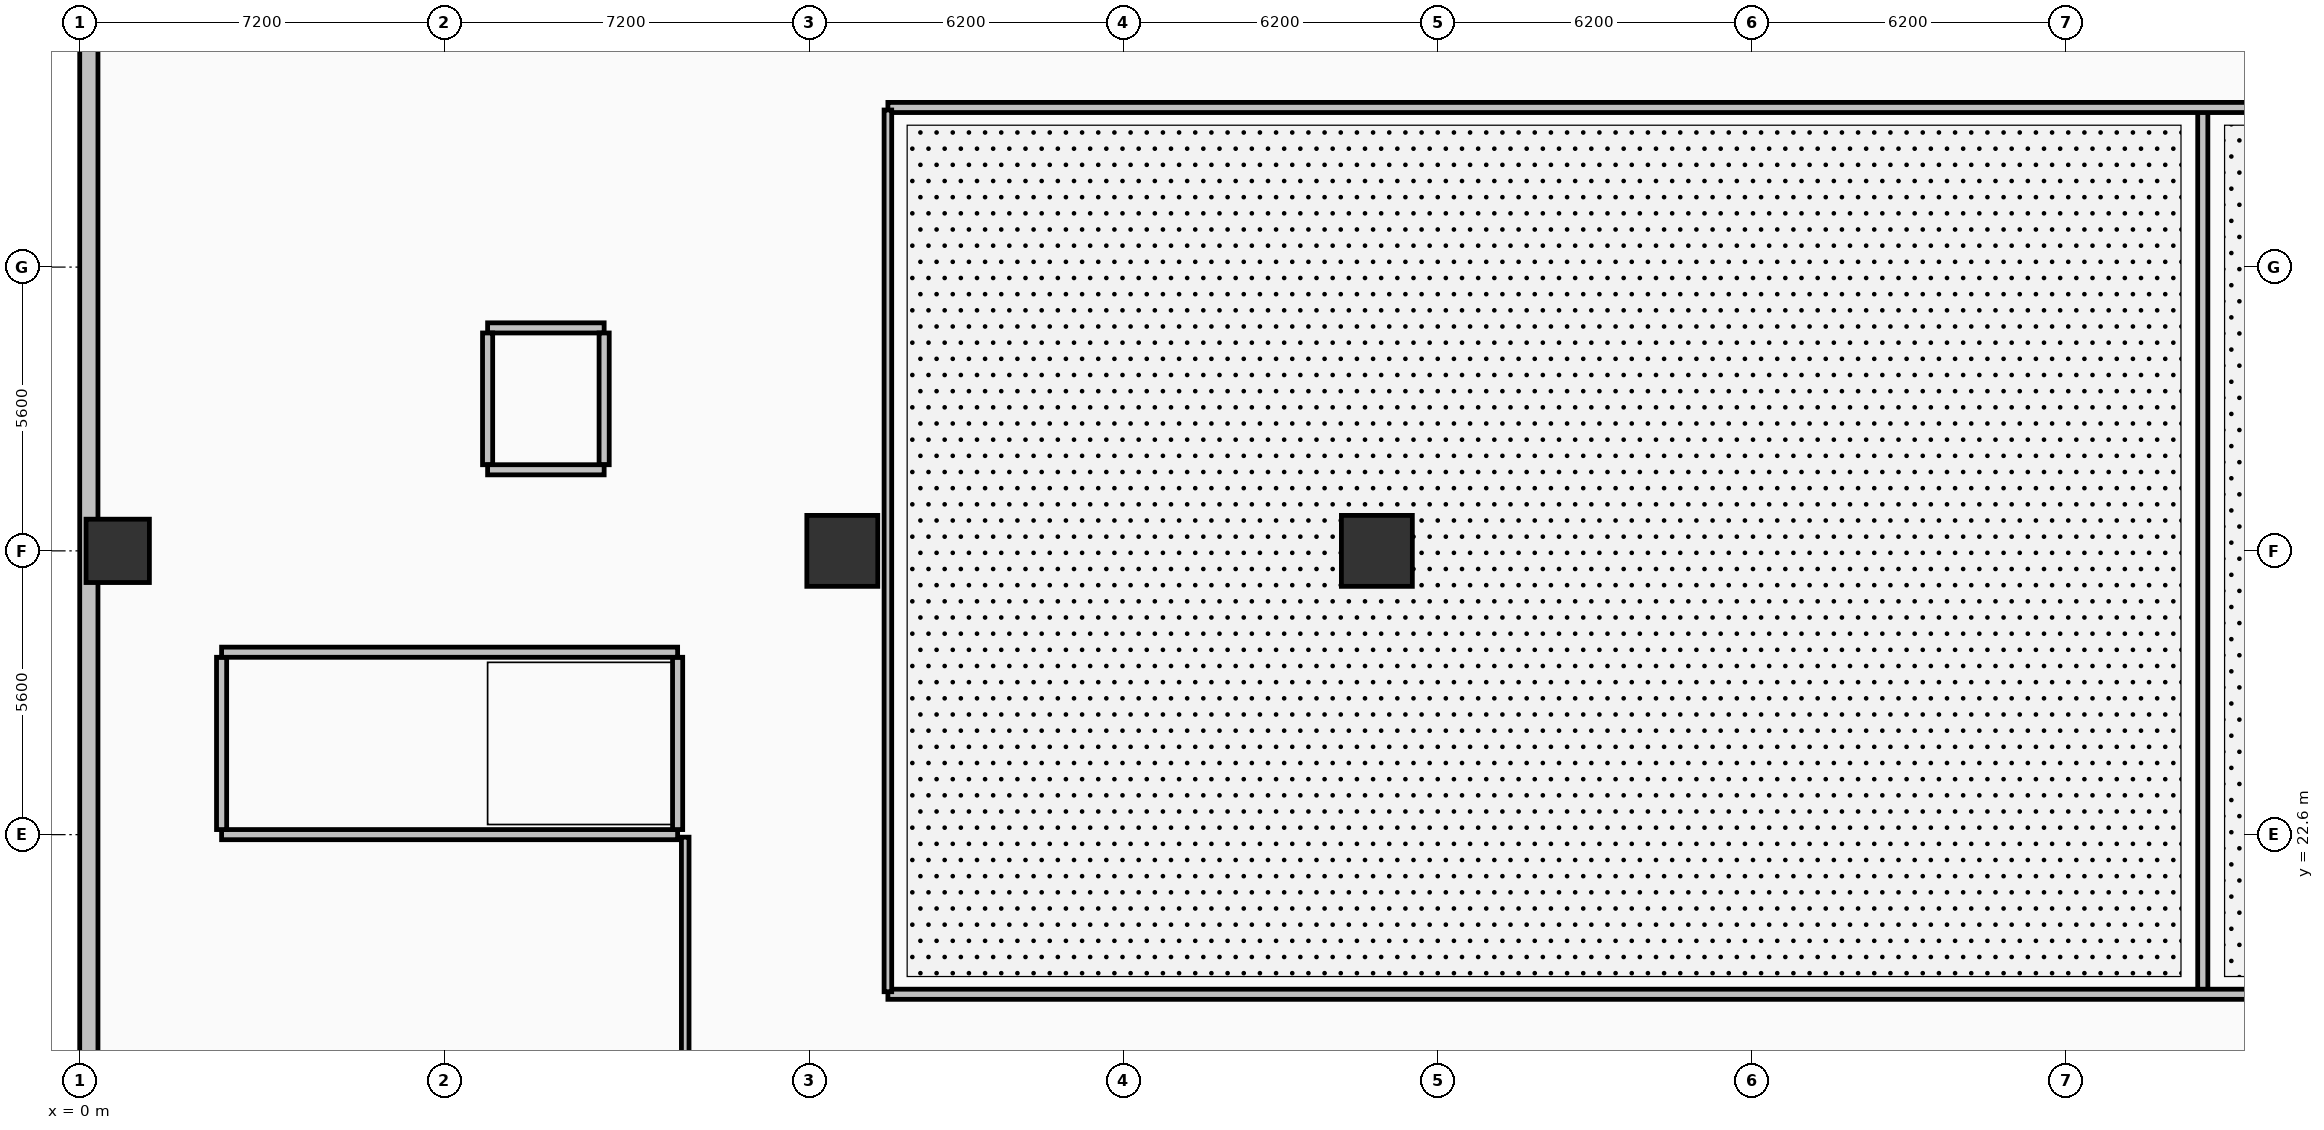
"""IFC4 building model, lengths in metres.
Left out: names, types, materials, properties, quantities, classifications, styles, units other than length and angle.
Written with IfcOpenShell. Run it as: python <this file> out.ifc"""

import sys

from ifc_helpers import new_model, si_unit, direction, frame, frame_2d, origin, origin_2d, place, context, subcontext, project, spatial, rectangle, extrude, element, fill, save


model = new_model("IFC4")
c1 = context("Model", 3, precision=1e-05, world=origin(), true_north=direction((0.0, 1.0)))
c2 = subcontext(c1, "Body", "Model", "MODEL_VIEW")
j1 = project(units=[si_unit("LENGTHUNIT", "METRE"), si_unit("PLANEANGLEUNIT", "RADIAN")], contexts=[c1])
p1 = place(None, origin())
s1 = spatial("IfcSite", under=j1, at=p1, CompositionType="ELEMENT")
p2 = place(p1, origin())
s2 = spatial("IfcBuilding", under=s1, at=p2, CompositionType="ELEMENT")
p3 = place(p2, frame((0.0, 0.0, 11.1)))
s3 = spatial("IfcBuildingStorey", under=s2, at=p3, CompositionType="ELEMENT", Elevation=11.1)
p4 = place(p3, frame((25.6, 28.2, 0.0), z_axis=(0.0, 0.0, 1.0), x_axis=(1.0, 0.0, 0.0)))
e1 = element("IfcColumn", 1, at=p4, inside=s3, PredefinedType="COLUMN", context=c2, shape_type="SweptSolid", body=[
    extrude(rectangle(XDim=1.4, YDim=1.4, at=origin_2d()), origin(), (0.0, 0.0, 1.0), 4.5),
])
p5 = place(p3, frame((0.75, 28.2, 0.0), z_axis=(0.0, 0.0, 1.0), x_axis=(1.0, 0.0, 0.0)))
e2 = element("IfcColumn", 2, at=p5, inside=s3, PredefinedType="COLUMN", context=c2, shape_type="SweptSolid", body=[
    extrude(rectangle(XDim=1.25, YDim=1.25, at=origin_2d()), origin(), (0.0, 0.0, 1.0), 4.5),
])
p6 = place(p3, frame((15.05, 28.2, 0.0), z_axis=(0.0, 0.0, 1.0), x_axis=(1.0, 0.0, 0.0)))
e3 = element("IfcColumn", 3, at=p6, inside=s3, PredefinedType="COLUMN", context=c2, shape_type="SweptSolid", body=[
    extrude(rectangle(XDim=1.4, YDim=1.4, at=origin_2d()), origin(), (0.0, 0.0, 1.0), 4.5),
])
p7 = place(p3, frame((0.18, 55.42, 0.0), z_axis=(0.0, 0.0, 1.0), x_axis=(0.0, -1.0, 0.0)))
e4 = element("IfcWall", 4, at=p7, inside=s3, PredefinedType="SOLIDWALL", context=c2, shape_type="SweptSolid", body=[
    extrude(rectangle(XDim=54.44, YDim=0.36, at=frame_2d((27.22, 0.0))), origin(), (0.0, 0.0, 1.0), 3.48),
])
p8 = place(p7, frame((1.411, 0.0, 0.9)))
e5 = element("IfcOpeningElement", 5, at=p8, cuts=e4, PredefinedType="OPENING", context=c2, shape_type="SweptSolid", body=[
    extrude(rectangle(XDim=1.8, YDim=2.1, at=frame_2d((0.9, 1.05))), frame((0.0, 0.19, 0.0), z_axis=(0.0, -1.0, 0.0), x_axis=(1.0, 0.0, 0.0)), (0.0, 0.0, 1.0), 0.38),
])
p9 = place(p7, frame((4.732, 0.0, 0.9)))
e6 = element("IfcOpeningElement", 6, at=p9, cuts=e4, PredefinedType="OPENING", context=c2, shape_type="SweptSolid", body=[
    extrude(rectangle(XDim=1.8, YDim=2.1, at=frame_2d((0.9, 1.05))), frame((0.0, 0.19, 0.0), z_axis=(0.0, -1.0, 0.0), x_axis=(1.0, 0.0, 0.0)), (0.0, 0.0, 1.0), 0.38),
])
p10 = place(p7, frame((11.375, 0.0, 0.9)))
e7 = element("IfcOpeningElement", 7, at=p10, cuts=e4, PredefinedType="OPENING", context=c2, shape_type="SweptSolid", body=[
    extrude(rectangle(XDim=1.8, YDim=2.1, at=frame_2d((0.9, 1.05))), frame((0.0, 0.19, 0.0), z_axis=(0.0, -1.0, 0.0), x_axis=(1.0, 0.0, 0.0)), (0.0, 0.0, 1.0), 0.38),
])
p11 = place(p7, frame((18.017, 0.0, 0.9)))
e8 = element("IfcOpeningElement", 8, at=p11, cuts=e4, PredefinedType="OPENING", context=c2, shape_type="SweptSolid", body=[
    extrude(rectangle(XDim=1.8, YDim=2.1, at=frame_2d((0.9, 1.05))), frame((0.0, 0.19, 0.0), z_axis=(0.0, -1.0, 0.0), x_axis=(1.0, 0.0, 0.0)), (0.0, 0.0, 1.0), 0.38),
])
p12 = place(p7, frame((21.338, 0.0, 0.9)))
e9 = element("IfcOpeningElement", 9, at=p12, cuts=e4, PredefinedType="OPENING", context=c2, shape_type="SweptSolid", body=[
    extrude(rectangle(XDim=1.8, YDim=2.1, at=frame_2d((0.9, 1.05))), frame((0.0, 0.19, 0.0), z_axis=(0.0, -1.0, 0.0), x_axis=(1.0, 0.0, 0.0)), (0.0, 0.0, 1.0), 0.38),
])
p13 = place(p7, frame((23.959, 0.0, 0.9)))
e10 = element("IfcOpeningElement", 10, at=p13, cuts=e4, PredefinedType="OPENING", context=c2, shape_type="SweptSolid", body=[
    extrude(rectangle(XDim=1.8, YDim=2.1, at=frame_2d((0.9, 1.05))), frame((0.0, 0.19, 0.0), z_axis=(0.0, -1.0, 0.0), x_axis=(1.0, 0.0, 0.0)), (0.0, 0.0, 1.0), 0.38),
])
p14 = place(p7, frame((28.681, 0.0, 0.9)))
e11 = element("IfcOpeningElement", 11, at=p14, cuts=e4, PredefinedType="OPENING", context=c2, shape_type="SweptSolid", body=[
    extrude(rectangle(XDim=1.8, YDim=2.1, at=frame_2d((0.9, 1.05))), frame((0.0, 0.19, 0.0), z_axis=(0.0, -1.0, 0.0), x_axis=(1.0, 0.0, 0.0)), (0.0, 0.0, 1.0), 0.38),
])
p15 = place(p7, frame((31.302, 0.0, 0.9)))
e12 = element("IfcOpeningElement", 12, at=p15, cuts=e4, PredefinedType="OPENING", context=c2, shape_type="SweptSolid", body=[
    extrude(rectangle(XDim=1.8, YDim=2.1, at=frame_2d((0.9, 1.05))), frame((0.0, 0.19, 0.0), z_axis=(0.0, -1.0, 0.0), x_axis=(1.0, 0.0, 0.0)), (0.0, 0.0, 1.0), 0.38),
])
p16 = place(p7, frame((34.623, 0.0, 0.9)))
e13 = element("IfcOpeningElement", 13, at=p16, cuts=e4, PredefinedType="OPENING", context=c2, shape_type="SweptSolid", body=[
    extrude(rectangle(XDim=1.8, YDim=2.1, at=frame_2d((0.9, 1.05))), frame((0.0, 0.19, 0.0), z_axis=(0.0, -1.0, 0.0), x_axis=(1.0, 0.0, 0.0)), (0.0, 0.0, 1.0), 0.38),
])
p17 = place(p7, frame((41.266, 0.0, 0.9)))
e14 = element("IfcOpeningElement", 14, at=p17, cuts=e4, PredefinedType="OPENING", context=c2, shape_type="SweptSolid", body=[
    extrude(rectangle(XDim=1.8, YDim=2.1, at=frame_2d((0.9, 1.05))), frame((0.0, 0.19, 0.0), z_axis=(0.0, -1.0, 0.0), x_axis=(1.0, 0.0, 0.0)), (0.0, 0.0, 1.0), 0.38),
])
p18 = place(p7, frame((47.908, 0.0, 0.9)))
e15 = element("IfcOpeningElement", 15, at=p18, cuts=e4, PredefinedType="OPENING", context=c2, shape_type="SweptSolid", body=[
    extrude(rectangle(XDim=1.8, YDim=2.1, at=frame_2d((0.9, 1.05))), frame((0.0, 0.19, 0.0), z_axis=(0.0, -1.0, 0.0), x_axis=(1.0, 0.0, 0.0)), (0.0, 0.0, 1.0), 0.38),
])
p19 = place(p7, frame((51.229, 0.0, 0.9)))
e16 = element("IfcOpeningElement", 16, at=p19, cuts=e4, PredefinedType="OPENING", context=c2, shape_type="SweptSolid", body=[
    extrude(rectangle(XDim=1.8, YDim=2.1, at=frame_2d((0.9, 1.05))), frame((0.0, 0.19, 0.0), z_axis=(0.0, -1.0, 0.0), x_axis=(1.0, 0.0, 0.0)), (0.0, 0.0, 1.0), 0.38),
])
p20 = place(p3, frame((2.8, 22.6, 0.0), z_axis=(0.0, 0.0, 1.0), x_axis=(1.0, 0.0, 0.0)))
e17 = element("IfcWall", 17, at=p20, inside=s3, PredefinedType="SHEAR", context=c2, shape_type="SweptSolid", body=[
    extrude(rectangle(XDim=9.0, YDim=0.2, at=frame_2d((4.5, 0.0))), origin(), (0.0, 0.0, 1.0), 4.5),
])
for number, where, z_axis, x_axis in (
    (18, (2.8, 22.7, 0.0), (0.0, 0.0, 1.0), (0.0, 1.0, 0.0)),
    (19, (11.8, 22.7, 0.0), (0.0, 0.0, 1.0), (0.0, 1.0, 0.0)),
):
    element("IfcWall", number, at=place(p3, frame(where, z_axis=z_axis, x_axis=x_axis)), inside=s3, PredefinedType="SHEAR", context=c2, shape_type="SweptSolid", body=[
        extrude(rectangle(XDim=3.4, YDim=0.2, at=frame_2d((1.7, 0.0))), origin(), (0.0, 0.0, 1.0), 4.5),
    ])
p21 = place(p3, frame((11.8, 26.2, 0.0), z_axis=(0.0, 0.0, 1.0), x_axis=(-1.0, 0.0, 0.0)))
e20 = element("IfcWall", 20, at=p21, inside=s3, PredefinedType="SHEAR", context=c2, shape_type="SweptSolid", body=[
    extrude(rectangle(XDim=9.0, YDim=0.2, at=frame_2d((4.5, 0.0))), origin(), (0.0, 0.0, 1.0), 4.5),
])
p22 = place(p21, frame((7.05, 0.0, 0.0)))
e21 = element("IfcOpeningElement", 21, at=p22, cuts=e20, PredefinedType="OPENING", context=c2, shape_type="SweptSolid", body=[
    extrude(rectangle(XDim=1.2, YDim=2.15, at=frame_2d((0.6, 1.075))), frame((0.0, 0.11, 0.0), z_axis=(0.0, -1.0, 0.0), x_axis=(1.0, 0.0, 0.0)), (0.0, 0.0, 1.0), 0.22),
])
p23 = place(p3, frame((8.05, 32.6, 0.0), z_axis=(0.0, 0.0, 1.0), x_axis=(1.0, 0.0, 0.0)))
e22 = element("IfcWall", 22, at=p23, inside=s3, PredefinedType="PARTITIONING", context=c2, shape_type="SweptSolid", body=[
    extrude(rectangle(XDim=2.3, YDim=0.2, at=frame_2d((1.15, 0.0))), origin(), (0.0, 0.0, 1.0), 3.42),
])
for number, where, z_axis, x_axis in (
    (23, (8.05, 29.9, 0.0), (0.0, 0.0, 1.0), (0.0, 1.0, 0.0)),
    (24, (10.35, 29.9, 0.0), (0.0, 0.0, 1.0), (0.0, 1.0, 0.0)),
):
    element("IfcWall", number, at=place(p3, frame(where, z_axis=z_axis, x_axis=x_axis)), inside=s3, PredefinedType="PARTITIONING", context=c2, shape_type="SweptSolid", body=[
        extrude(rectangle(XDim=2.6, YDim=0.2, at=frame_2d((1.3, 0.0))), origin(), (0.0, 0.0, 1.0), 3.42),
    ])
p24 = place(p3, frame((8.05, 29.8, 0.0), z_axis=(0.0, 0.0, 1.0), x_axis=(1.0, 0.0, 0.0)))
e25 = element("IfcWall", 25, at=p24, inside=s3, PredefinedType="PARTITIONING", context=c2, shape_type="SweptSolid", body=[
    extrude(rectangle(XDim=2.3, YDim=0.2, at=frame_2d((1.15, 0.0))), origin(), (0.0, 0.0, 1.0), 3.42),
])
p25 = place(p24, frame((0.65, 0.0, 0.0)))
e26 = element("IfcOpeningElement", 26, at=p25, cuts=e25, PredefinedType="OPENING", context=c2, shape_type="SweptSolid", body=[
    extrude(rectangle(XDim=1.0, YDim=2.15, at=frame_2d((0.5, 1.075))), frame((0.0, 0.11, 0.0), z_axis=(0.0, -1.0, 0.0), x_axis=(1.0, 0.0, 0.0)), (0.0, 0.0, 1.0), 0.22),
])
p26 = place(p3, frame((41.9, 19.5, 0.0), z_axis=(0.0, 0.0, 1.0), x_axis=(0.0, 1.0, 0.0)))
e27 = element("IfcWall", 27, at=p26, inside=s3, PredefinedType="PARTITIONING", context=c2, shape_type="SweptSolid", body=[
    extrude(rectangle(XDim=17.4, YDim=0.2, at=frame_2d((8.7, 0.0))), origin(), (0.0, 0.0, 1.0), 3.42),
])
p27 = place(p3, frame((15.95, 19.45, 0.0), z_axis=(0.0, 0.0, 1.0), x_axis=(1.0, 0.0, 0.0)))
e28 = element("IfcWall", 28, at=p27, inside=s3, PredefinedType="PARTITIONING", context=c2, shape_type="SweptSolid", body=[
    extrude(rectangle(XDim=46.5, YDim=0.2, at=frame_2d((23.25, 0.0))), origin(), (0.0, 0.0, 1.0), 3.42),
])
p28 = place(p27, frame((2.65, 0.0, 0.0)))
e29 = element("IfcOpeningElement", 29, at=p28, cuts=e28, PredefinedType="OPENING", context=c2, shape_type="SweptSolid", body=[
    extrude(rectangle(XDim=1.2, YDim=2.15, at=frame_2d((0.6, 1.075))), frame((0.0, 0.11, 0.0), z_axis=(0.0, -1.0, 0.0), x_axis=(1.0, 0.0, 0.0)), (0.0, 0.0, 1.0), 0.22),
])
p29 = place(p27, frame((28.65, 0.0, 0.0)))
e30 = element("IfcOpeningElement", 30, at=p29, cuts=e28, PredefinedType="OPENING", context=c2, shape_type="SweptSolid", body=[
    extrude(rectangle(XDim=1.2, YDim=2.15, at=frame_2d((0.6, 1.075))), frame((0.0, 0.11, 0.0), z_axis=(0.0, -1.0, 0.0), x_axis=(1.0, 0.0, 0.0)), (0.0, 0.0, 1.0), 0.22),
])
p30 = place(p27, frame((39.65, 0.0, 0.0)))
e31 = element("IfcOpeningElement", 31, at=p30, cuts=e28, PredefinedType="OPENING", context=c2, shape_type="SweptSolid", body=[
    extrude(rectangle(XDim=1.2, YDim=2.15, at=frame_2d((0.6, 1.075))), frame((0.0, 0.11, 0.0), z_axis=(0.0, -1.0, 0.0), x_axis=(1.0, 0.0, 0.0)), (0.0, 0.0, 1.0), 0.22),
])
p31 = place(p3, frame((62.45, 36.95, 0.0), z_axis=(0.0, 0.0, 1.0), x_axis=(-1.0, 0.0, 0.0)))
e32 = element("IfcWall", 32, at=p31, inside=s3, PredefinedType="PARTITIONING", context=c2, shape_type="SweptSolid", body=[
    extrude(rectangle(XDim=46.5, YDim=0.2, at=frame_2d((23.25, 0.0))), origin(), (0.0, 0.0, 1.0), 3.42),
])
p32 = place(p31, frame((23.25, 0.0, 0.0)))
e33 = element("IfcOpeningElement", 33, at=p32, cuts=e32, PredefinedType="OPENING", context=c2, shape_type="SweptSolid", body=[
    extrude(rectangle(XDim=1.2, YDim=2.15, at=frame_2d((0.6, 1.075))), frame((0.0, 0.11, 0.0), z_axis=(0.0, -1.0, 0.0), x_axis=(1.0, 0.0, 0.0)), (0.0, 0.0, 1.0), 0.22),
])
p33 = place(p31, frame((12.25, 0.0, 0.0)))
e34 = element("IfcOpeningElement", 34, at=p33, cuts=e32, PredefinedType="OPENING", context=c2, shape_type="SweptSolid", body=[
    extrude(rectangle(XDim=1.2, YDim=2.15, at=frame_2d((0.6, 1.075))), frame((0.0, 0.11, 0.0), z_axis=(0.0, -1.0, 0.0), x_axis=(1.0, 0.0, 0.0)), (0.0, 0.0, 1.0), 0.22),
])
p34 = place(p31, frame((2.65, 0.0, 0.0)))
e35 = element("IfcOpeningElement", 35, at=p34, cuts=e32, PredefinedType="OPENING", context=c2, shape_type="SweptSolid", body=[
    extrude(rectangle(XDim=1.2, YDim=2.15, at=frame_2d((0.6, 1.075))), frame((0.0, 0.11, 0.0), z_axis=(0.0, -1.0, 0.0), x_axis=(1.0, 0.0, 0.0)), (0.0, 0.0, 1.0), 0.22),
])
p35 = place(p3, frame((15.95, 19.5, 0.0), z_axis=(0.0, 0.0, 1.0), x_axis=(0.0, 1.0, 0.0)))
e36 = element("IfcWall", 36, at=p35, inside=s3, PredefinedType="PARTITIONING", context=c2, shape_type="SweptSolid", body=[
    extrude(rectangle(XDim=17.4, YDim=0.15, at=frame_2d((8.7, 0.0))), origin(), (0.0, 0.0, 1.0), 3.42),
])
p36 = place(p3, frame((11.95, 16.9, 0.0), z_axis=(0.0, 0.0, 1.0), x_axis=(0.0, 1.0, 0.0)))
e37 = element("IfcWall", 37, at=p36, inside=s3, PredefinedType="PARTITIONING", context=c2, shape_type="SweptSolid", body=[
    extrude(rectangle(XDim=5.65, YDim=0.15, at=frame_2d((2.825, 0.0))), origin(), (0.0, 0.0, 1.0), 3.42),
])
p37 = place(p36, frame((2.1, 0.0, 0.0)))
e38 = element("IfcOpeningElement", 38, at=p37, cuts=e37, PredefinedType="OPENING", context=c2, shape_type="SweptSolid", body=[
    extrude(rectangle(XDim=0.95, YDim=2.1, at=frame_2d((0.475, 1.05))), frame((0.0, 0.085, 0.0), z_axis=(0.0, -1.0, 0.0), x_axis=(1.0, 0.0, 0.0)), (0.0, 0.0, 1.0), 0.17),
])
p38 = place(p11, origin())
e39 = element("IfcWindow", 39, at=p38, inside=s3, PartitioningType="SINGLE_PANEL", PredefinedType="WINDOW", context=c2, shape_type="SweptSolid", body=[
    extrude(rectangle(XDim=1.8, YDim=2.1, at=frame_2d((0.9, 1.05))), frame((0.0, 0.03, 0.0), z_axis=(0.0, -1.0, 0.0), x_axis=(1.0, 0.0, 0.0)), (0.0, 0.0, 1.0), 0.06),
])
fill(e8, e39)
p39 = place(p12, origin())
e40 = element("IfcWindow", 40, at=p39, inside=s3, PartitioningType="SINGLE_PANEL", PredefinedType="WINDOW", context=c2, shape_type="SweptSolid", body=[
    extrude(rectangle(XDim=1.8, YDim=2.1, at=frame_2d((0.9, 1.05))), frame((0.0, 0.03, 0.0), z_axis=(0.0, -1.0, 0.0), x_axis=(1.0, 0.0, 0.0)), (0.0, 0.0, 1.0), 0.06),
])
fill(e9, e40)
p40 = place(p13, origin())
e41 = element("IfcWindow", 41, at=p40, inside=s3, PartitioningType="SINGLE_PANEL", PredefinedType="WINDOW", context=c2, shape_type="SweptSolid", body=[
    extrude(rectangle(XDim=1.8, YDim=2.1, at=frame_2d((0.9, 1.05))), frame((0.0, 0.03, 0.0), z_axis=(0.0, -1.0, 0.0), x_axis=(1.0, 0.0, 0.0)), (0.0, 0.0, 1.0), 0.06),
])
fill(e10, e41)
p41 = place(p14, origin())
e42 = element("IfcWindow", 42, at=p41, inside=s3, PartitioningType="SINGLE_PANEL", PredefinedType="WINDOW", context=c2, shape_type="SweptSolid", body=[
    extrude(rectangle(XDim=1.8, YDim=2.1, at=frame_2d((0.9, 1.05))), frame((0.0, 0.03, 0.0), z_axis=(0.0, -1.0, 0.0), x_axis=(1.0, 0.0, 0.0)), (0.0, 0.0, 1.0), 0.06),
])
fill(e11, e42)
p42 = place(p15, origin())
e43 = element("IfcWindow", 43, at=p42, inside=s3, PartitioningType="SINGLE_PANEL", PredefinedType="WINDOW", context=c2, shape_type="SweptSolid", body=[
    extrude(rectangle(XDim=1.8, YDim=2.1, at=frame_2d((0.9, 1.05))), frame((0.0, 0.03, 0.0), z_axis=(0.0, -1.0, 0.0), x_axis=(1.0, 0.0, 0.0)), (0.0, 0.0, 1.0), 0.06),
])
fill(e12, e43)
p43 = place(p16, origin())
e44 = element("IfcWindow", 44, at=p43, inside=s3, PartitioningType="SINGLE_PANEL", PredefinedType="WINDOW", context=c2, shape_type="SweptSolid", body=[
    extrude(rectangle(XDim=1.8, YDim=2.1, at=frame_2d((0.9, 1.05))), frame((0.0, 0.03, 0.0), z_axis=(0.0, -1.0, 0.0), x_axis=(1.0, 0.0, 0.0)), (0.0, 0.0, 1.0), 0.06),
])
fill(e13, e44)
p44 = place(p22, origin())
e45 = element("IfcDoor", 45, at=p44, inside=s3, OperationType="SINGLE_SWING_LEFT", PredefinedType="DOOR", context=c2, shape_type="SweptSolid", body=[
    extrude(rectangle(XDim=1.2, YDim=2.15, at=frame_2d((0.6, 1.075))), frame((0.0, 0.025, 0.0), z_axis=(0.0, -1.0, 0.0), x_axis=(1.0, 0.0, 0.0)), (0.0, 0.0, 1.0), 0.05),
])
fill(e21, e45)
p45 = place(p25, origin())
e46 = element("IfcDoor", 46, at=p45, inside=s3, OperationType="SLIDING_TO_LEFT", PredefinedType="DOOR", context=c2, shape_type="SweptSolid", body=[
    extrude(rectangle(XDim=1.0, YDim=2.15, at=frame_2d((0.5, 1.075))), frame((0.0, 0.025, 0.0), z_axis=(0.0, -1.0, 0.0), x_axis=(1.0, 0.0, 0.0)), (0.0, 0.0, 1.0), 0.05),
])
fill(e26, e46)
p46 = place(p28, origin())
e47 = element("IfcDoor", 47, at=p46, inside=s3, OperationType="SINGLE_SWING_LEFT", PredefinedType="DOOR", context=c2, shape_type="SweptSolid", body=[
    extrude(rectangle(XDim=1.2, YDim=2.15, at=frame_2d((0.6, 1.075))), frame((0.0, 0.025, 0.0), z_axis=(0.0, -1.0, 0.0), x_axis=(1.0, 0.0, 0.0)), (0.0, 0.0, 1.0), 0.05),
])
fill(e29, e47)
p47 = place(p32, origin())
e48 = element("IfcDoor", 48, at=p47, inside=s3, OperationType="SINGLE_SWING_RIGHT", PredefinedType="DOOR", context=c2, shape_type="SweptSolid", body=[
    extrude(rectangle(XDim=1.2, YDim=2.15, at=frame_2d((0.6, 1.075))), frame((0.0, 0.025, 0.0), z_axis=(0.0, -1.0, 0.0), x_axis=(1.0, 0.0, 0.0)), (0.0, 0.0, 1.0), 0.05),
])
fill(e33, e48)
p48 = place(p37, origin())
e49 = element("IfcDoor", 49, at=p48, inside=s3, OperationType="SINGLE_SWING_LEFT", PredefinedType="DOOR", context=c2, shape_type="SweptSolid", body=[
    extrude(rectangle(XDim=0.95, YDim=2.1, at=frame_2d((0.475, 1.05))), frame((0.0, 0.025, 0.0), z_axis=(0.0, -1.0, 0.0), x_axis=(1.0, 0.0, 0.0)), (0.0, 0.0, 1.0), 0.05),
])
fill(e38, e49)
save(model, sys.argv[1])
